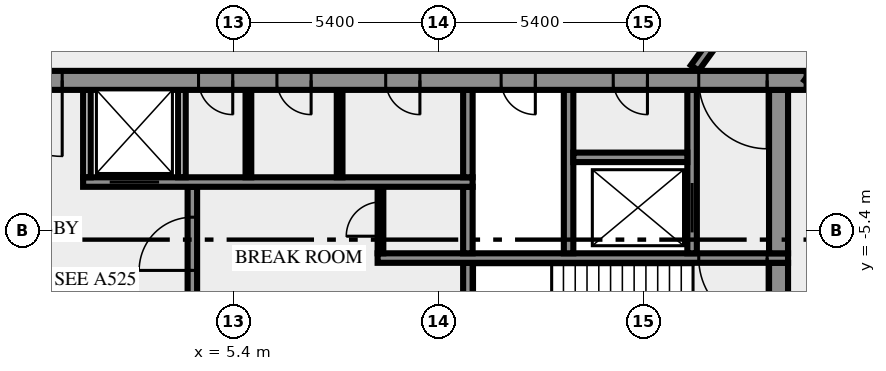
"""IFC4 building model, lengths in metres.
Left out: names, types, materials, properties, quantities, classifications, styles, units other than length and angle.
Written with IfcOpenShell. Run it as: python <this file> out.ifc"""

import sys

from ifc_helpers import new_model, si_unit, direction, frame, frame_2d, origin, place, context, subcontext, project, spatial, rectangle, extrude, element, fill, save


model = new_model("IFC4")
c1 = context("Model", 3, precision=1e-05, world=origin(), true_north=direction((0.0, 1.0)))
c2 = subcontext(c1, "Body", "Model", "MODEL_VIEW")
j1 = project(units=[si_unit("LENGTHUNIT", "METRE"), si_unit("PLANEANGLEUNIT", "RADIAN")], contexts=[c1])
p1 = place(None, origin())
s1 = spatial("IfcSite", under=j1, at=p1, CompositionType="ELEMENT")
p2 = place(p1, origin())
s2 = spatial("IfcBuilding", under=s1, at=p2, CompositionType="ELEMENT")
p3 = place(p2, frame((0.0, 0.0, 339.0)))
s3 = spatial("IfcBuildingStorey", under=s2, at=p3, CompositionType="ELEMENT", Elevation=339.0)
p4 = place(p3, frame((19.75, -10.5, 0.0), z_axis=(0.0, 0.0, 1.0), x_axis=(0.0, 1.0, 0.0)))
e1 = element("IfcWall", 1, at=p4, inside=s3, PredefinedType="SHEAR", context=c2, shape_type="SweptSolid", body=[
    extrude(rectangle(XDim=4.25, YDim=0.5, at=frame_2d((2.125, 0.0))), origin(), (0.0, 0.0, 1.0), 3.65),
])
p5 = place(p3, frame((4.325, -7.25, 0.0), z_axis=(0.0, 0.0, 1.0), x_axis=(0.0, 1.0, 0.0)))
e2 = element("IfcWall", 2, at=p5, inside=s3, PredefinedType="SHEAR", context=c2, shape_type="SweptSolid", body=[
    extrude(rectangle(XDim=3.0, YDim=0.25, at=frame_2d((1.5, 0.0))), origin(), (0.0, 0.0, 1.0), 3.65),
])
p6 = place(p5, frame((0.8, 0.0, 0.0)))
e3 = element("IfcOpeningElement", 3, at=p6, cuts=e2, PredefinedType="OPENING", context=c2, shape_type="SweptSolid", body=[
    extrude(rectangle(XDim=1.4, YDim=2.1, at=frame_2d((0.7, 1.05))), frame((0.0, 0.135, 0.0), z_axis=(0.0, -1.0, 0.0), x_axis=(1.0, 0.0, 0.0)), (0.0, 0.0, 1.0), 0.27),
])
p7 = place(p3, frame((11.575, -7.25, 0.0), z_axis=(0.0, 0.0, 1.0), x_axis=(0.0, 1.0, 0.0)))
e4 = element("IfcWall", 4, at=p7, inside=s3, PredefinedType="SHEAR", context=c2, shape_type="SweptSolid", body=[
    extrude(rectangle(XDim=1.0, YDim=0.25, at=frame_2d((0.5, 0.0))), origin(), (0.0, 0.0, 1.0), 3.65),
])
p8 = place(p3, frame((20.0, -6.125, 0.0), z_axis=(0.0, 0.0, 1.0), x_axis=(-1.0, 0.0, 0.0)))
e5 = element("IfcWall", 5, at=p8, inside=s3, PredefinedType="SHEAR", context=c2, shape_type="SweptSolid", body=[
    extrude(rectangle(XDim=10.8, YDim=0.25, at=frame_2d((5.4, 0.0))), origin(), (0.0, 0.0, 1.0), 3.65),
])
p9 = place(p8, frame((0.55, 0.0, 0.0)))
e6 = element("IfcOpeningElement", 6, at=p9, cuts=e5, PredefinedType="OPENING", context=c2, shape_type="SweptSolid", body=[
    extrude(rectangle(XDim=1.8, YDim=2.1, at=frame_2d((0.9, 1.05))), frame((0.0, 0.135, 0.0), z_axis=(0.0, -1.0, 0.0), x_axis=(1.0, 0.0, 0.0)), (0.0, 0.0, 1.0), 0.27),
])
p10 = place(p3, frame((9.275, -6.0, 0.0), z_axis=(0.0, 0.0, 1.0), x_axis=(0.0, 1.0, 0.0)))
e7 = element("IfcWall", 7, at=p10, inside=s3, PredefinedType="PARTITIONING", context=c2, shape_type="SweptSolid", body=[
    extrude(rectangle(XDim=1.75, YDim=0.15, at=frame_2d((0.875, 0.0))), origin(), (0.0, 0.0, 1.0), 3.65),
])
p11 = place(p10, frame((0.45, 0.0, 0.0)))
e8 = element("IfcOpeningElement", 8, at=p11, cuts=e7, PredefinedType="OPENING", context=c2, shape_type="SweptSolid", body=[
    extrude(rectangle(XDim=0.9, YDim=2.1, at=frame_2d((0.45, 1.05))), frame((0.0, 0.085, 0.0), z_axis=(0.0, -1.0, 0.0), x_axis=(1.0, 0.0, 0.0)), (0.0, 0.0, 1.0), 0.17),
])
p12 = place(p3, frame((11.575, -6.0, 0.0), z_axis=(0.0, 0.0, 1.0), x_axis=(0.0, 1.0, 0.0)))
e9 = element("IfcWall", 9, at=p12, inside=s3, PredefinedType="SHEAR", context=c2, shape_type="SweptSolid", body=[
    extrude(rectangle(XDim=1.75, YDim=0.25, at=frame_2d((0.875, 0.0))), origin(), (0.0, 0.0, 1.0), 3.65),
])
p13 = place(p3, frame((14.225, -6.0, 0.0), z_axis=(0.0, 0.0, 1.0), x_axis=(0.0, 1.0, 0.0)))
e10 = element("IfcWall", 10, at=p13, inside=s3, PredefinedType="SHEAR", context=c2, shape_type="SweptSolid", body=[
    extrude(rectangle(XDim=4.3, YDim=0.25, at=frame_2d((2.15, 0.0))), origin(), (0.0, 0.0, 1.0), 3.65),
])
p14 = place(p3, frame((17.475, -6.0, 0.0), z_axis=(0.0, 0.0, 1.0), x_axis=(0.0, 1.0, 0.0)))
e11 = element("IfcWall", 11, at=p14, inside=s3, PredefinedType="SHEAR", context=c2, shape_type="SweptSolid", body=[
    extrude(rectangle(XDim=4.3, YDim=0.25, at=frame_2d((2.15, 0.0))), origin(), (0.0, 0.0, 1.0), 3.65),
])
p15 = place(p14, frame((0.55, 0.0, 0.0)))
e12 = element("IfcOpeningElement", 12, at=p15, cuts=e11, PredefinedType="OPENING", context=c2, shape_type="SweptSolid", body=[
    extrude(rectangle(XDim=1.3, YDim=2.1, at=frame_2d((0.65, 1.05))), frame((0.0, 0.135, 0.0), z_axis=(0.0, -1.0, 0.0), x_axis=(1.0, 0.0, 0.0)), (0.0, 0.0, 1.0), 0.27),
])
p16 = place(p3, frame((19.75, -6.0, 0.0), z_axis=(0.0, 0.0, 1.0), x_axis=(0.0, 1.0, 0.0)))
e13 = element("IfcWall", 13, at=p16, inside=s3, PredefinedType="SHEAR", context=c2, shape_type="SweptSolid", body=[
    extrude(rectangle(XDim=4.3, YDim=0.5, at=frame_2d((2.15, 0.0))), origin(), (0.0, 0.0, 1.0), 3.65),
])
p17 = place(p3, frame((1.45, -4.125, 0.0), z_axis=(0.0, 0.0, 1.0), x_axis=(1.0, 0.0, 0.0)))
e14 = element("IfcWall", 14, at=p17, inside=s3, PredefinedType="SHEAR", context=c2, shape_type="SweptSolid", body=[
    extrude(rectangle(XDim=10.25, YDim=0.25, at=frame_2d((5.125, 0.0))), origin(), (0.0, 0.0, 1.0), 3.65),
])
p18 = place(p17, frame((0.7, 0.0, 0.0)))
e15 = element("IfcOpeningElement", 15, at=p18, cuts=e14, PredefinedType="OPENING", context=c2, shape_type="SweptSolid", body=[
    extrude(rectangle(XDim=1.3, YDim=2.1, at=frame_2d((0.65, 1.05))), frame((0.0, 0.135, 0.0), z_axis=(0.0, -1.0, 0.0), x_axis=(1.0, 0.0, 0.0)), (0.0, 0.0, 1.0), 0.27),
])
for number, where, z_axis, x_axis in (
    (16, (1.55, -4.0, 0.0), (0.0, 0.0, 1.0), (0.0, 1.0, 0.0)),
    (17, (4.05, -4.0, 0.0), (0.0, 0.0, 1.0), (0.0, 1.0, 0.0)),
):
    element("IfcWall", number, at=place(p3, frame(where, z_axis=z_axis, x_axis=x_axis)), inside=s3, PredefinedType="SOLIDWALL", context=c2, shape_type="SweptSolid", body=[
        extrude(rectangle(XDim=2.3, YDim=0.2, at=frame_2d((1.15, 0.0))), origin(), (0.0, 0.0, 1.0), 3.65),
    ])
for number, where, z_axis, x_axis in (
    (18, (5.8, -4.0, 0.0), (0.0, 0.0, 1.0), (0.0, 1.0, 0.0)),
    (19, (8.2, -4.0, 0.0), (0.0, 0.0, 1.0), (0.0, 1.0, 0.0)),
):
    element("IfcWall", number, at=place(p3, frame(where, z_axis=z_axis, x_axis=x_axis)), inside=s3, PredefinedType="PARTITIONING", context=c2, shape_type="SweptSolid", body=[
        extrude(rectangle(XDim=2.3, YDim=0.15, at=frame_2d((1.15, 0.0))), origin(), (0.0, 0.0, 1.0), 3.65),
    ])
p19 = place(p3, frame((11.575, -4.0, 0.0), z_axis=(0.0, 0.0, 1.0), x_axis=(0.0, 1.0, 0.0)))
e20 = element("IfcWall", 20, at=p19, inside=s3, PredefinedType="SHEAR", context=c2, shape_type="SweptSolid", body=[
    extrude(rectangle(XDim=2.3, YDim=0.25, at=frame_2d((1.15, 0.0))), origin(), (0.0, 0.0, 1.0), 3.65),
])
p20 = place(p3, frame((14.35, -3.475, 0.0), z_axis=(0.0, 0.0, 1.0), x_axis=(1.0, 0.0, 0.0)))
e21 = element("IfcWall", 21, at=p20, inside=s3, PredefinedType="SHEAR", context=c2, shape_type="SweptSolid", body=[
    extrude(rectangle(XDim=3.0, YDim=0.25, at=frame_2d((1.5, 0.0))), origin(), (0.0, 0.0, 1.0), 3.65),
])
p21 = place(p3, frame((20.49, -1.45, 0.0), z_axis=(0.0, 0.0, 1.0), x_axis=(-1.0, 0.0, 0.0)))
e22 = element("IfcWall", 22, at=p21, inside=s3, PredefinedType="SHEAR", context=c2, shape_type="SweptSolid", body=[
    extrude(rectangle(XDim=40.98, YDim=0.5, at=frame_2d((20.49, 0.0))), origin(), (0.0, 0.0, 1.0), 3.65),
])
p22 = place(p21, frame((38.14, 0.0, 0.0)))
e23 = element("IfcOpeningElement", 23, at=p22, cuts=e22, PredefinedType="OPENING", context=c2, shape_type="SweptSolid", body=[
    extrude(rectangle(XDim=1.8, YDim=2.1, at=frame_2d((0.9, 1.05))), frame((0.0, 0.26, 0.0), z_axis=(0.0, -1.0, 0.0), x_axis=(1.0, 0.0, 0.0)), (0.0, 0.0, 1.0), 0.52),
])
p23 = place(p21, frame((36.728, 0.0, 0.0)))
e24 = element("IfcOpeningElement", 24, at=p23, cuts=e22, PredefinedType="OPENING", context=c2, shape_type="SweptSolid", body=[
    extrude(rectangle(XDim=0.8, YDim=2.1, at=frame_2d((0.4, 1.05))), frame((0.0, 0.26, 0.0), z_axis=(0.0, -1.0, 0.0), x_axis=(1.0, 0.0, 0.0)), (0.0, 0.0, 1.0), 0.52),
])
p24 = place(p21, frame((35.153, 0.0, 0.0)))
e25 = element("IfcOpeningElement", 25, at=p24, cuts=e22, PredefinedType="OPENING", context=c2, shape_type="SweptSolid", body=[
    extrude(rectangle(XDim=0.8, YDim=2.1, at=frame_2d((0.4, 1.05))), frame((0.0, 0.26, 0.0), z_axis=(0.0, -1.0, 0.0), x_axis=(1.0, 0.0, 0.0)), (0.0, 0.0, 1.0), 0.52),
])
p25 = place(p21, frame((32.94, 0.0, 0.0)))
e26 = element("IfcOpeningElement", 26, at=p25, cuts=e22, PredefinedType="OPENING", context=c2, shape_type="SweptSolid", body=[
    extrude(rectangle(XDim=0.9, YDim=2.1, at=frame_2d((0.45, 1.05))), frame((0.0, 0.26, 0.0), z_axis=(0.0, -1.0, 0.0), x_axis=(1.0, 0.0, 0.0)), (0.0, 0.0, 1.0), 0.52),
])
p26 = place(p21, frame((31.015, 0.0, 0.0)))
e27 = element("IfcOpeningElement", 27, at=p26, cuts=e22, PredefinedType="OPENING", context=c2, shape_type="SweptSolid", body=[
    extrude(rectangle(XDim=0.8, YDim=2.1, at=frame_2d((0.4, 1.05))), frame((0.0, 0.26, 0.0), z_axis=(0.0, -1.0, 0.0), x_axis=(1.0, 0.0, 0.0)), (0.0, 0.0, 1.0), 0.52),
])
p27 = place(p21, frame((24.765, 0.0, 0.0)))
e28 = element("IfcOpeningElement", 28, at=p27, cuts=e22, PredefinedType="OPENING", context=c2, shape_type="SweptSolid", body=[
    extrude(rectangle(XDim=0.8, YDim=2.1, at=frame_2d((0.4, 1.05))), frame((0.0, 0.26, 0.0), z_axis=(0.0, -1.0, 0.0), x_axis=(1.0, 0.0, 0.0)), (0.0, 0.0, 1.0), 0.52),
])
p28 = place(p21, frame((19.59, 0.0, 0.0)))
e29 = element("IfcOpeningElement", 29, at=p28, cuts=e22, PredefinedType="OPENING", context=c2, shape_type="SweptSolid", body=[
    extrude(rectangle(XDim=2.0, YDim=2.1, at=frame_2d((1.0, 1.05))), frame((0.0, 0.26, 0.0), z_axis=(0.0, -1.0, 0.0), x_axis=(1.0, 0.0, 0.0)), (0.0, 0.0, 1.0), 0.52),
])
p29 = place(p21, frame((15.103, 0.0, 0.0)))
e30 = element("IfcOpeningElement", 30, at=p29, cuts=e22, PredefinedType="OPENING", context=c2, shape_type="SweptSolid", body=[
    extrude(rectangle(XDim=0.9, YDim=2.1, at=frame_2d((0.45, 1.05))), frame((0.0, 0.26, 0.0), z_axis=(0.0, -1.0, 0.0), x_axis=(1.0, 0.0, 0.0)), (0.0, 0.0, 1.0), 0.52),
])
p30 = place(p21, frame((13.04, 0.0, 0.0)))
e31 = element("IfcOpeningElement", 31, at=p30, cuts=e22, PredefinedType="OPENING", context=c2, shape_type="SweptSolid", body=[
    extrude(rectangle(XDim=0.9, YDim=2.1, at=frame_2d((0.45, 1.05))), frame((0.0, 0.26, 0.0), z_axis=(0.0, -1.0, 0.0), x_axis=(1.0, 0.0, 0.0)), (0.0, 0.0, 1.0), 0.52),
])
p31 = place(p21, frame((10.177, 0.0, 0.0)))
e32 = element("IfcOpeningElement", 32, at=p31, cuts=e22, PredefinedType="OPENING", context=c2, shape_type="SweptSolid", body=[
    extrude(rectangle(XDim=0.9, YDim=2.1, at=frame_2d((0.45, 1.05))), frame((0.0, 0.26, 0.0), z_axis=(0.0, -1.0, 0.0), x_axis=(1.0, 0.0, 0.0)), (0.0, 0.0, 1.0), 0.52),
])
p32 = place(p21, frame((7.14, 0.0, 0.0)))
e33 = element("IfcOpeningElement", 33, at=p32, cuts=e22, PredefinedType="OPENING", context=c2, shape_type="SweptSolid", body=[
    extrude(rectangle(XDim=0.9, YDim=2.1, at=frame_2d((0.45, 1.05))), frame((0.0, 0.26, 0.0), z_axis=(0.0, -1.0, 0.0), x_axis=(1.0, 0.0, 0.0)), (0.0, 0.0, 1.0), 0.52),
])
p33 = place(p21, frame((4.19, 0.0, 0.0)))
e34 = element("IfcOpeningElement", 34, at=p33, cuts=e22, PredefinedType="OPENING", context=c2, shape_type="SweptSolid", body=[
    extrude(rectangle(XDim=0.9, YDim=2.1, at=frame_2d((0.45, 1.05))), frame((0.0, 0.26, 0.0), z_axis=(0.0, -1.0, 0.0), x_axis=(1.0, 0.0, 0.0)), (0.0, 0.0, 1.0), 0.52),
])
p34 = place(p21, frame((1.04, 0.0, 0.0)))
e35 = element("IfcOpeningElement", 35, at=p34, cuts=e22, PredefinedType="OPENING", context=c2, shape_type="SweptSolid", body=[
    extrude(rectangle(XDim=1.8, YDim=2.1, at=frame_2d((0.9, 1.05))), frame((0.0, 0.26, 0.0), z_axis=(0.0, -1.0, 0.0), x_axis=(1.0, 0.0, 0.0)), (0.0, 0.0, 1.0), 0.52),
])
p35 = place(p3, frame((17.545, -1.125, 0.0), z_axis=(0.0, 0.0, 1.0), x_axis=(0.58779555165, 0.809009511354, 0.0)))
e36 = element("IfcWall", 36, at=p35, inside=s3, PredefinedType="SOLIDWALL", context=c2, shape_type="SweptSolid", body=[
    extrude(rectangle(XDim=18.103, YDim=0.25, at=frame_2d((9.052, 0.0))), origin(), (0.0, 0.0, 1.0), 3.65),
])
p36 = place(p35, frame((16.728, 0.0, 0.0)))
e37 = element("IfcOpeningElement", 37, at=p36, cuts=e36, PredefinedType="OPENING", context=c2, shape_type="SweptSolid", body=[
    extrude(rectangle(XDim=0.9, YDim=2.1, at=frame_2d((0.45, 1.05))), frame((0.0, 0.135, 0.0), z_axis=(0.0, -1.0, 0.0), x_axis=(1.0, 0.0, 0.0)), (0.0, 0.0, 1.0), 0.27),
])
p37 = place(p3, frame((30.183, 11.761, 0.0), z_axis=(0.0, 0.0, 1.0), x_axis=(-0.587781762867, -0.80901952958, 0.0)))
e38 = element("IfcWall", 38, at=p37, inside=s3, PredefinedType="SOLIDWALL", context=c2, shape_type="SweptSolid", body=[
    extrude(rectangle(XDim=16.42, YDim=0.25, at=frame_2d((8.21, 0.0))), origin(), (0.0, 0.0, 1.0), 3.65),
])
p38 = place(p37, frame((0.225, 0.0, 0.0)))
e39 = element("IfcOpeningElement", 39, at=p38, cuts=e38, PredefinedType="OPENING", context=c2, shape_type="SweptSolid", body=[
    extrude(rectangle(XDim=0.9, YDim=2.1, at=frame_2d((0.45, 1.05))), frame((0.0, 0.135, 0.0), z_axis=(0.0, -1.0, 0.0), x_axis=(1.0, 0.0, 0.0)), (0.0, 0.0, 1.0), 0.27),
])
p39 = place(p37, frame((9.304, 0.0, 0.0)))
e40 = element("IfcOpeningElement", 40, at=p39, cuts=e38, PredefinedType="OPENING", context=c2, shape_type="SweptSolid", body=[
    extrude(rectangle(XDim=0.9, YDim=2.1, at=frame_2d((0.45, 1.05))), frame((0.0, 0.135, 0.0), z_axis=(0.0, -1.0, 0.0), x_axis=(1.0, 0.0, 0.0)), (0.0, 0.0, 1.0), 0.27),
])
p40 = place(p6, origin())
e41 = element("IfcDoor", 41, at=p40, inside=s3, OperationType="DOUBLE_DOOR_SINGLE_SWING", PredefinedType="DOOR", context=c2, shape_type="SweptSolid", body=[
    extrude(rectangle(XDim=1.4, YDim=2.1, at=frame_2d((0.7, 1.05))), frame((0.0, 0.025, 0.0), z_axis=(0.0, -1.0, 0.0), x_axis=(1.0, 0.0, 0.0)), (0.0, 0.0, 1.0), 0.05),
])
fill(e3, e41)
p41 = place(p9, origin())
e42 = element("IfcDoor", 42, at=p41, inside=s3, OperationType="DOUBLE_DOOR_SINGLE_SWING", PredefinedType="DOOR", context=c2, shape_type="SweptSolid", body=[
    extrude(rectangle(XDim=1.8, YDim=2.1, at=frame_2d((0.9, 1.05))), frame((0.0, 0.025, 0.0), z_axis=(0.0, -1.0, 0.0), x_axis=(1.0, 0.0, 0.0)), (0.0, 0.0, 1.0), 0.05),
])
fill(e6, e42)
p42 = place(p11, origin())
e43 = element("IfcDoor", 43, at=p42, inside=s3, OperationType="SINGLE_SWING_RIGHT", PredefinedType="DOOR", context=c2, shape_type="SweptSolid", body=[
    extrude(rectangle(XDim=0.9, YDim=2.1, at=frame_2d((0.45, 1.05))), frame((0.0, 0.025, 0.0), z_axis=(0.0, -1.0, 0.0), x_axis=(1.0, 0.0, 0.0)), (0.0, 0.0, 1.0), 0.05),
])
fill(e8, e43)
p43 = place(p15, origin())
e44 = element("IfcDoor", 44, at=p43, inside=s3, OperationType="DOUBLE_DOOR_SLIDING", PredefinedType="DOOR", context=c2, shape_type="SweptSolid", body=[
    extrude(rectangle(XDim=1.3, YDim=2.1, at=frame_2d((0.65, 1.05))), frame((0.0, 0.025, 0.0), z_axis=(0.0, -1.0, 0.0), x_axis=(1.0, 0.0, 0.0)), (0.0, 0.0, 1.0), 0.05),
])
fill(e12, e44)
p44 = place(p18, origin())
e45 = element("IfcDoor", 45, at=p44, inside=s3, OperationType="DOUBLE_DOOR_SLIDING", PredefinedType="DOOR", context=c2, shape_type="SweptSolid", body=[
    extrude(rectangle(XDim=1.3, YDim=2.1, at=frame_2d((0.65, 1.05))), frame((0.0, 0.025, 0.0), z_axis=(0.0, -1.0, 0.0), x_axis=(1.0, 0.0, 0.0)), (0.0, 0.0, 1.0), 0.05),
])
fill(e15, e45)
p45 = place(p28, origin())
e46 = element("IfcDoor", 46, at=p45, inside=s3, OperationType="DOUBLE_DOOR_SINGLE_SWING", PredefinedType="DOOR", context=c2, shape_type="SweptSolid", body=[
    extrude(rectangle(XDim=2.0, YDim=2.1, at=frame_2d((1.0, 1.05))), frame((0.0, 0.025, 0.0), z_axis=(0.0, -1.0, 0.0), x_axis=(1.0, 0.0, 0.0)), (0.0, 0.0, 1.0), 0.05),
])
fill(e29, e46)
p46 = place(p29, origin())
e47 = element("IfcDoor", 47, at=p46, inside=s3, OperationType="SINGLE_SWING_LEFT", PredefinedType="DOOR", context=c2, shape_type="SweptSolid", body=[
    extrude(rectangle(XDim=0.9, YDim=2.1, at=frame_2d((0.45, 1.05))), frame((0.0, 0.025, 0.0), z_axis=(0.0, -1.0, 0.0), x_axis=(1.0, 0.0, 0.0)), (0.0, 0.0, 1.0), 0.05),
])
fill(e30, e47)
p47 = place(p30, origin())
e48 = element("IfcDoor", 48, at=p47, inside=s3, OperationType="SINGLE_SWING_LEFT", PredefinedType="DOOR", context=c2, shape_type="SweptSolid", body=[
    extrude(rectangle(XDim=0.9, YDim=2.1, at=frame_2d((0.45, 1.05))), frame((0.0, 0.025, 0.0), z_axis=(0.0, -1.0, 0.0), x_axis=(1.0, 0.0, 0.0)), (0.0, 0.0, 1.0), 0.05),
])
fill(e31, e48)
p48 = place(p31, origin())
e49 = element("IfcDoor", 49, at=p48, inside=s3, OperationType="SINGLE_SWING_LEFT", PredefinedType="DOOR", context=c2, shape_type="SweptSolid", body=[
    extrude(rectangle(XDim=0.9, YDim=2.1, at=frame_2d((0.45, 1.05))), frame((0.0, 0.025, 0.0), z_axis=(0.0, -1.0, 0.0), x_axis=(1.0, 0.0, 0.0)), (0.0, 0.0, 1.0), 0.05),
])
fill(e32, e49)
p49 = place(p32, origin())
e50 = element("IfcDoor", 50, at=p49, inside=s3, OperationType="SINGLE_SWING_LEFT", PredefinedType="DOOR", context=c2, shape_type="SweptSolid", body=[
    extrude(rectangle(XDim=0.9, YDim=2.1, at=frame_2d((0.45, 1.05))), frame((0.0, 0.025, 0.0), z_axis=(0.0, -1.0, 0.0), x_axis=(1.0, 0.0, 0.0)), (0.0, 0.0, 1.0), 0.05),
])
fill(e33, e50)
p50 = place(p33, origin())
e51 = element("IfcDoor", 51, at=p50, inside=s3, OperationType="SINGLE_SWING_LEFT", PredefinedType="DOOR", context=c2, shape_type="SweptSolid", body=[
    extrude(rectangle(XDim=0.9, YDim=2.1, at=frame_2d((0.45, 1.05))), frame((0.0, 0.025, 0.0), z_axis=(0.0, -1.0, 0.0), x_axis=(1.0, 0.0, 0.0)), (0.0, 0.0, 1.0), 0.05),
])
fill(e34, e51)
p51 = place(p34, origin())
e52 = element("IfcDoor", 52, at=p51, inside=s3, OperationType="DOUBLE_DOOR_SINGLE_SWING", PredefinedType="DOOR", context=c2, shape_type="SweptSolid", body=[
    extrude(rectangle(XDim=1.8, YDim=2.1, at=frame_2d((0.9, 1.05))), frame((0.0, 0.025, 0.0), z_axis=(0.0, -1.0, 0.0), x_axis=(1.0, 0.0, 0.0)), (0.0, 0.0, 1.0), 0.05),
])
fill(e35, e52)
save(model, sys.argv[1])
